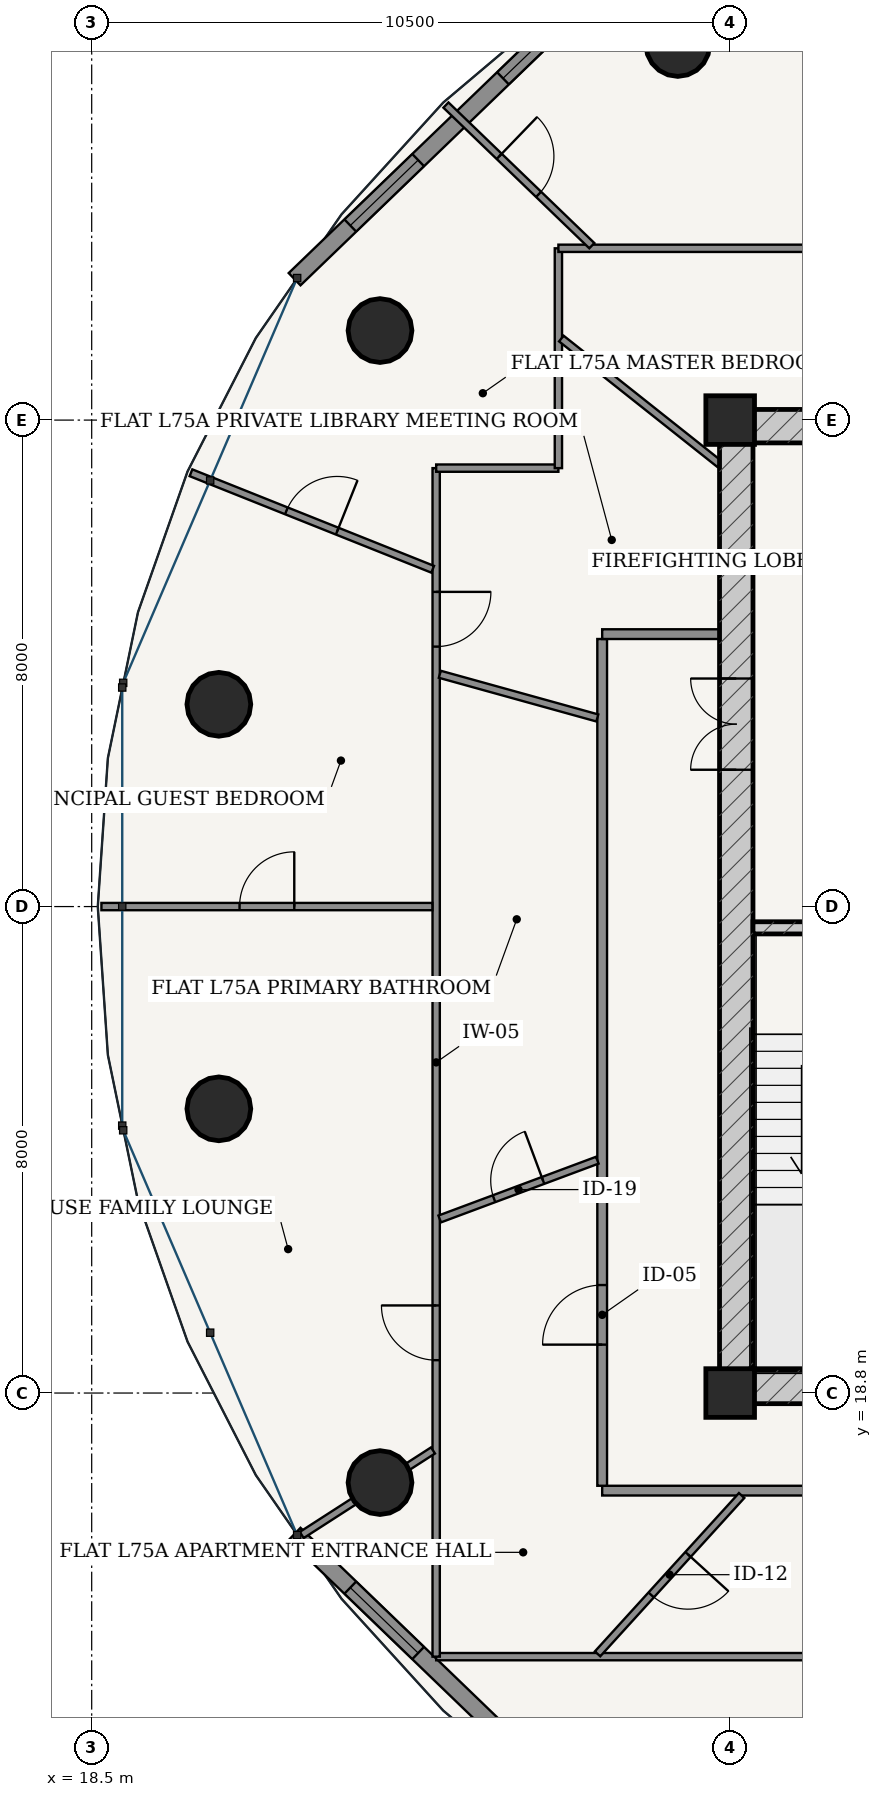
"""IFC4 building model, lengths in metres.
Left out: names, types, materials, properties, quantities, classifications, styles, units other than length and angle.
Written with IfcOpenShell. Run it as: python <this file> out.ifc"""

import sys

from ifc_helpers import new_model, si_unit, direction, frame, frame_2d, origin, origin_2d, place, context, subcontext, project, spatial, rectangle, hollow_circle, extrude, source, transform, mapped, element, fill, save


model = new_model("IFC4")
c1 = context("Model", 3, precision=1e-05, world=origin(), true_north=direction((-0.2419218956, 0.970295726276)))
c2 = subcontext(c1, "Body", "Model", "MODEL_VIEW")
j1 = project(units=[si_unit("LENGTHUNIT", "METRE"), si_unit("PLANEANGLEUNIT", "RADIAN")], contexts=[c1])
p1 = place(None, origin())
s1 = spatial("IfcSite", under=j1, at=p1, CompositionType="ELEMENT")
p2 = place(p1, origin())
s2 = spatial("IfcBuilding", under=s1, at=p2, CompositionType="ELEMENT")
p3 = place(p2, frame((0.0, 0.0, 285.7)))
s3 = spatial("IfcBuildingStorey", under=s2, at=p3, CompositionType="ELEMENT", Elevation=285.7)
for number, where, z_axis, x_axis in (
    (1, (29.0, 18.8, 0.0), (0.0, 0.0, 1.0), (1.0, 0.0, 0.0)),
    (2, (29.0, 34.8, 0.0), (0.0, 0.0, 1.0), (1.0, 0.0, 0.0)),
):
    element("IfcColumn", number, at=place(p3, frame(where, z_axis=z_axis, x_axis=x_axis)), inside=s3, PredefinedType="COLUMN", context=c2, shape_type="SweptSolid", body=[
        extrude(rectangle(XDim=0.8, YDim=0.8, at=origin_2d()), origin(), (0.0, 0.0, 1.0), 3.75),
    ])
p4 = place(p3, frame((28.825, 18.9, 0.0), z_axis=(0.0, 0.0, 1.0), x_axis=(1.0, 0.0, 0.0)))
e3 = element("IfcWall", 3, at=p4, inside=s3, PredefinedType="SHEAR", context=c2, shape_type="SweptSolid", body=[
    extrude(rectangle(XDim=18.35, YDim=0.55, at=frame_2d((9.175, 0.0))), origin(), (0.0, 0.0, 1.0), 3.49),
])
p5 = place(p4, frame((7.41, 0.0, 0.0)))
e4 = element("IfcOpeningElement", 4, at=p5, cuts=e3, PredefinedType="OPENING", context=c2, shape_type="SweptSolid", body=[
    extrude(rectangle(XDim=0.85, YDim=2.1, at=frame_2d((0.425, 1.05))), frame((0.0, 0.285, 0.0), z_axis=(0.0, -1.0, 0.0), x_axis=(1.0, 0.0, 0.0)), (0.0, 0.0, 1.0), 0.57),
])
p6 = place(p4, frame((10.49, 0.0, 0.0)))
e5 = element("IfcOpeningElement", 5, at=p6, cuts=e3, PredefinedType="OPENING", context=c2, shape_type="SweptSolid", body=[
    extrude(rectangle(XDim=0.85, YDim=2.1, at=frame_2d((0.425, 1.05))), frame((0.0, 0.285, 0.0), z_axis=(0.0, -1.0, 0.0), x_axis=(1.0, 0.0, 0.0)), (0.0, 0.0, 1.0), 0.57),
])
p7 = place(p3, frame((28.825, 34.7, 0.0), z_axis=(0.0, 0.0, 1.0), x_axis=(1.0, 0.0, 0.0)))
e6 = element("IfcWall", 6, at=p7, inside=s3, PredefinedType="SHEAR", context=c2, shape_type="SweptSolid", body=[
    extrude(rectangle(XDim=18.35, YDim=0.55, at=frame_2d((9.175, 0.0))), origin(), (0.0, 0.0, 1.0), 3.49),
])
p8 = place(p3, frame((29.1, 19.175, 0.0), z_axis=(0.0, 0.0, 1.0), x_axis=(0.0, 1.0, 0.0)))
e7 = element("IfcWall", 7, at=p8, inside=s3, PredefinedType="SHEAR", context=c2, shape_type="SweptSolid", body=[
    extrude(rectangle(XDim=15.25, YDim=0.55, at=frame_2d((7.625, 0.0))), origin(), (0.0, 0.0, 1.0), 3.49),
])
p9 = place(p8, frame((9.875, 0.0, 0.0)))
e8 = element("IfcOpeningElement", 8, at=p9, cuts=e7, PredefinedType="OPENING", context=c2, shape_type="SweptSolid", body=[
    extrude(rectangle(XDim=1.5, YDim=2.2, at=frame_2d((0.75, 1.1))), frame((0.0, 0.285, 0.0), z_axis=(0.0, -1.0, 0.0), x_axis=(1.0, 0.0, 0.0)), (0.0, 0.0, 1.0), 0.57),
])
p10 = place(p3, frame((29.375, 26.45, 0.0), z_axis=(0.0, 0.0, 1.0), x_axis=(1.0, 0.0, 0.0)))
e9 = element("IfcWall", 9, at=p10, inside=s3, PredefinedType="SOLIDWALL", context=c2, shape_type="SweptSolid", body=[
    extrude(rectangle(XDim=3.32, YDim=0.2, at=frame_2d((1.66, 0.0))), origin(), (0.0, 0.0, 1.0), 3.49),
])
p11 = place(p10, frame((1.185, 0.0, 0.0)))
e10 = element("IfcOpeningElement", 10, at=p11, cuts=e9, PredefinedType="OPENING", context=c2, shape_type="SweptSolid", body=[
    extrude(rectangle(XDim=0.95, YDim=2.15, at=frame_2d((0.475, 1.075))), frame((0.0, 0.11, 0.0), z_axis=(0.0, -1.0, 0.0), x_axis=(1.0, 0.0, 0.0)), (0.0, 0.0, 1.0), 0.22),
])
for number, where, z_axis, x_axis in (
    (11, (28.139, 40.977, 0.0), (0.0, 0.0, 1.0), (1.0, 0.0, 0.0)),
    (12, (23.241, 36.272, 0.0), (0.0, 0.0, 1.0), (1.0, 0.0, 0.0)),
    (13, (20.591, 30.126, 0.0), (0.0, 0.0, 1.0), (1.0, 0.0, 0.0)),
    (14, (20.591, 23.474, 0.0), (0.0, 0.0, 1.0), (1.0, 0.0, 0.0)),
    (15, (23.241, 17.328, 0.0), (0.0, 0.0, 1.0), (1.0, 0.0, 0.0)),
):
    element("IfcColumn", number, at=place(p3, frame(where, z_axis=z_axis, x_axis=x_axis)), inside=s3, PredefinedType="COLUMN", context=c2, shape_type="SweptSolid", body=[
        extrude(hollow_circle(Radius=0.525, WallThickness=0.035, at=origin_2d()), origin(), (0.0, 0.0, 1.0), 3.75),
    ])
p12 = place(p3, frame((27.296, 42.379, 0.0), z_axis=(0.0, 0.0, 1.0), x_axis=(-0.719979309073, -0.693995529169, 0.0)))
e16 = element("IfcWall", 16, at=p12, inside=s3, PredefinedType="SOLIDWALL", context=c2, shape_type="SweptSolid", body=[
    extrude(rectangle(XDim=7.583, YDim=0.28, at=frame_2d((3.791, 0.0))), origin(), (0.0, 0.0, 1.0), 3.49),
])
p13 = place(p12, frame((1.272, 0.0, 0.85)))
e17 = element("IfcOpeningElement", 17, at=p13, cuts=e16, PredefinedType="OPENING", context=c2, shape_type="SweptSolid", body=[
    extrude(rectangle(XDim=1.55, YDim=1.95, at=frame_2d((0.775, 0.975))), frame((0.0, 0.15, 0.0), z_axis=(0.0, -1.0, 0.0), x_axis=(1.0, 0.0, 0.0)), (0.0, 0.0, 1.0), 0.3),
])
p14 = place(p12, frame((4.76, 0.0, 0.85)))
e18 = element("IfcOpeningElement", 18, at=p14, cuts=e16, PredefinedType="OPENING", context=c2, shape_type="SweptSolid", body=[
    extrude(rectangle(XDim=1.55, YDim=1.95, at=frame_2d((0.775, 0.975))), frame((0.0, 0.15, 0.0), z_axis=(0.0, -1.0, 0.0), x_axis=(1.0, 0.0, 0.0)), (0.0, 0.0, 1.0), 0.3),
])
p15 = place(p3, frame((21.837, 16.483, 0.0), z_axis=(0.0, 0.0, 1.0), x_axis=(0.719995397366, -0.69397883813, 0.0)))
e19 = element("IfcWall", 19, at=p15, inside=s3, PredefinedType="SOLIDWALL", context=c2, shape_type="SweptSolid", body=[
    extrude(rectangle(XDim=7.582, YDim=0.28, at=frame_2d((3.791, 0.0))), origin(), (0.0, 0.0, 1.0), 3.49),
])
p16 = place(p15, frame((1.272, 0.0, 0.85)))
e20 = element("IfcOpeningElement", 20, at=p16, cuts=e19, PredefinedType="OPENING", context=c2, shape_type="SweptSolid", body=[
    extrude(rectangle(XDim=1.55, YDim=1.95, at=frame_2d((0.775, 0.975))), frame((0.0, 0.15, 0.0), z_axis=(0.0, -1.0, 0.0), x_axis=(1.0, 0.0, 0.0)), (0.0, 0.0, 1.0), 0.3),
])
p17 = place(p15, frame((4.76, 0.0, 0.85)))
e21 = element("IfcOpeningElement", 21, at=p17, cuts=e19, PredefinedType="OPENING", context=c2, shape_type="SweptSolid", body=[
    extrude(rectangle(XDim=1.55, YDim=1.95, at=frame_2d((0.775, 0.975))), frame((0.0, 0.15, 0.0), z_axis=(0.0, -1.0, 0.0), x_axis=(1.0, 0.0, 0.0)), (0.0, 0.0, 1.0), 0.3),
])
p18 = place(p3, frame((26.895, 17.195, 0.0), z_axis=(0.0, 0.0, 1.0), x_axis=(1.0, 0.0, 0.0)))
e22 = element("IfcWall", 22, at=p18, inside=s3, PredefinedType="PARTITIONING", context=c2, shape_type="SweptSolid", body=[
    extrude(rectangle(XDim=22.21, YDim=0.16, at=frame_2d((11.105, 0.0))), origin(), (0.0, 0.0, 1.0), 3.015),
])
p19 = place(p18, frame((17.365, 0.0, 0.0)))
e23 = element("IfcOpeningElement", 23, at=p19, cuts=e22, PredefinedType="OPENING", context=c2, shape_type="SweptSolid", body=[
    extrude(rectangle(XDim=0.98, YDim=2.2, at=frame_2d((0.49, 1.1))), frame((0.0, 0.09, 0.0), z_axis=(0.0, -1.0, 0.0), x_axis=(1.0, 0.0, 0.0)), (0.0, 0.0, 1.0), 0.18),
])
p20 = place(p3, frame((26.895, 17.275, 0.0), z_axis=(0.0, 0.0, 1.0), x_axis=(0.0, 1.0, 0.0)))
e24 = element("IfcWall", 24, at=p20, inside=s3, PredefinedType="PARTITIONING", context=c2, shape_type="SweptSolid", body=[
    extrude(rectangle(XDim=13.925, YDim=0.16, at=frame_2d((6.962, 0.0))), origin(), (0.0, 0.0, 1.0), 3.015),
])
p21 = place(p20, frame((2.321, 0.0, 0.0)))
e25 = element("IfcOpeningElement", 25, at=p21, cuts=e24, PredefinedType="OPENING", context=c2, shape_type="SweptSolid", body=[
    extrude(rectangle(XDim=0.98, YDim=2.2, at=frame_2d((0.49, 1.1))), frame((0.0, 0.09, 0.0), z_axis=(0.0, -1.0, 0.0), x_axis=(1.0, 0.0, 0.0)), (0.0, 0.0, 1.0), 0.18),
])
p22 = place(p3, frame((26.895, 31.28, 0.0), z_axis=(0.0, 0.0, 1.0), x_axis=(1.0, 0.0, 0.0)))
e26 = element("IfcWall", 26, at=p22, inside=s3, PredefinedType="PARTITIONING", context=c2, shape_type="SweptSolid", body=[
    extrude(rectangle(XDim=1.93, YDim=0.16, at=frame_2d((0.965, 0.0))), origin(), (0.0, 0.0, 1.0), 3.49),
])
p23 = place(p3, frame((35.353, 14.465, 0.0), z_axis=(0.0, 0.0, 1.0), x_axis=(-1.0, 0.0, 0.0)))
e27 = element("IfcWall", 27, at=p23, inside=s3, PredefinedType="PARTITIONING", context=c2, shape_type="SweptSolid", body=[
    extrude(rectangle(XDim=11.188, YDim=0.12, at=frame_2d((5.594, 0.0))), origin(), (0.0, 0.0, 1.0), 3.015),
])
p24 = place(p23, frame((3.997, 0.0, 0.0)))
e28 = element("IfcOpeningElement", 28, at=p24, cuts=e27, PredefinedType="OPENING", context=c2, shape_type="SweptSolid", body=[
    extrude(rectangle(XDim=0.9, YDim=2.15, at=frame_2d((0.45, 1.075))), frame((0.0, 0.07, 0.0), z_axis=(0.0, -1.0, 0.0), x_axis=(1.0, 0.0, 0.0)), (0.0, 0.0, 1.0), 0.14),
])
p25 = place(p3, frame((24.165, 14.465, 0.0), z_axis=(0.0, 0.0, 1.0), x_axis=(0.0, 1.0, 0.0)))
e29 = element("IfcWall", 29, at=p25, inside=s3, PredefinedType="PARTITIONING", context=c2, shape_type="SweptSolid", body=[
    extrude(rectangle(XDim=19.545, YDim=0.12, at=frame_2d((9.772, 0.0))), origin(), (0.0, 0.0, 1.0), 3.015),
])
p26 = place(p25, frame((4.875, 0.0, 0.0)))
e30 = element("IfcOpeningElement", 30, at=p26, cuts=e29, PredefinedType="OPENING", context=c2, shape_type="SweptSolid", body=[
    extrude(rectangle(XDim=0.9, YDim=2.15, at=frame_2d((0.45, 1.075))), frame((0.0, 0.07, 0.0), z_axis=(0.0, -1.0, 0.0), x_axis=(1.0, 0.0, 0.0)), (0.0, 0.0, 1.0), 0.14),
])
p27 = place(p25, frame((16.61, 0.0, 0.0)))
e31 = element("IfcOpeningElement", 31, at=p27, cuts=e29, PredefinedType="OPENING", context=c2, shape_type="SweptSolid", body=[
    extrude(rectangle(XDim=0.9, YDim=2.15, at=frame_2d((0.45, 1.075))), frame((0.0, 0.07, 0.0), z_axis=(0.0, -1.0, 0.0), x_axis=(1.0, 0.0, 0.0)), (0.0, 0.0, 1.0), 0.14),
])
p28 = place(p3, frame((24.165, 34.01, 0.0), z_axis=(0.0, 0.0, 1.0), x_axis=(1.0, 0.0, 0.0)))
e32 = element("IfcWall", 32, at=p28, inside=s3, PredefinedType="PARTITIONING", context=c2, shape_type="SweptSolid", body=[
    extrude(rectangle(XDim=2.01, YDim=0.12, at=frame_2d((1.005, 0.0))), origin(), (0.0, 0.0, 1.0), 3.209),
])
p29 = place(p3, frame((26.175, 34.01, 0.0), z_axis=(0.0, 0.0, 1.0), x_axis=(0.0, 1.0, 0.0)))
e33 = element("IfcWall", 33, at=p29, inside=s3, PredefinedType="PARTITIONING", context=c2, shape_type="SweptSolid", body=[
    extrude(rectangle(XDim=3.615, YDim=0.12, at=frame_2d((1.808, 0.0))), origin(), (0.0, 0.0, 1.0), 3.015),
])
p30 = place(p3, frame((26.175, 37.625, 0.0), z_axis=(0.0, 0.0, 1.0), x_axis=(1.0, 0.0, 0.0)))
e34 = element("IfcWall", 34, at=p30, inside=s3, PredefinedType="PARTITIONING", context=c2, shape_type="SweptSolid", body=[
    extrude(rectangle(XDim=13.957, YDim=0.12, at=frame_2d((6.979, 0.0))), origin(), (0.0, 0.0, 1.0), 3.015),
])
p31 = place(p30, frame((10.852, 0.0, 0.0)))
e35 = element("IfcOpeningElement", 35, at=p31, cuts=e34, PredefinedType="OPENING", context=c2, shape_type="SweptSolid", body=[
    extrude(rectangle(XDim=0.86, YDim=2.15, at=frame_2d((0.43, 1.075))), frame((0.0, 0.07, 0.0), z_axis=(0.0, -1.0, 0.0), x_axis=(1.0, 0.0, 0.0)), (0.0, 0.0, 1.0), 0.14),
])
p32 = place(p30, frame((4.183, 0.0, 0.0)))
e36 = element("IfcOpeningElement", 36, at=p32, cuts=e34, PredefinedType="OPENING", context=c2, shape_type="SweptSolid", body=[
    extrude(rectangle(XDim=0.9, YDim=2.15, at=frame_2d((0.45, 1.075))), frame((0.0, 0.07, 0.0), z_axis=(0.0, -1.0, 0.0), x_axis=(1.0, 0.0, 0.0)), (0.0, 0.0, 1.0), 0.14),
])
p33 = place(p3, frame((26.725, 37.668, 0.0), z_axis=(0.0, 0.0, 1.0), x_axis=(-0.719954096891, 0.694021684366, 0.0)))
e37 = element("IfcWall", 37, at=p33, inside=s3, PredefinedType="PARTITIONING", context=c2, shape_type="SweptSolid", body=[
    extrude(rectangle(XDim=3.333, YDim=0.12, at=frame_2d((1.667, 0.0))), origin(), (0.0, 0.0, 1.0), 3.121),
])
p34 = place(p33, frame((1.216, 0.0, 0.0)))
e38 = element("IfcOpeningElement", 38, at=p34, cuts=e37, PredefinedType="OPENING", context=c2, shape_type="SweptSolid", body=[
    extrude(rectangle(XDim=0.9, YDim=2.15, at=frame_2d((0.45, 1.075))), frame((0.0, 0.07, 0.0), z_axis=(0.0, -1.0, 0.0), x_axis=(1.0, 0.0, 0.0)), (0.0, 0.0, 1.0), 0.14),
])
p35 = place(p3, frame((24.107, 32.347, 0.0), z_axis=(0.0, 0.0, 1.0), x_axis=(-0.928712556691, 0.370800467966, 0.0)))
e39 = element("IfcWall", 39, at=p35, inside=s3, PredefinedType="PARTITIONING", context=c2, shape_type="SweptSolid", body=[
    extrude(rectangle(XDim=4.28, YDim=0.12, at=frame_2d((2.14, 0.0))), origin(), (0.0, 0.0, 1.0), 3.121),
])
p36 = place(p35, frame((1.69, 0.0, 0.0)))
e40 = element("IfcOpeningElement", 40, at=p36, cuts=e39, PredefinedType="OPENING", context=c2, shape_type="SweptSolid", body=[
    extrude(rectangle(XDim=0.9, YDim=2.15, at=frame_2d((0.45, 1.075))), frame((0.0, 0.07, 0.0), z_axis=(0.0, -1.0, 0.0), x_axis=(1.0, 0.0, 0.0)), (0.0, 0.0, 1.0), 0.14),
])
p37 = place(p3, frame((24.103, 26.8, 0.0), z_axis=(0.0, 0.0, 1.0), x_axis=(-1.0, 0.0, 0.0)))
e41 = element("IfcWall", 41, at=p37, inside=s3, PredefinedType="PARTITIONING", context=c2, shape_type="SweptSolid", body=[
    extrude(rectangle(XDim=5.443, YDim=0.12, at=frame_2d((2.722, 0.0))), origin(), (0.0, 0.0, 1.0), 3.121),
])
p38 = place(p37, frame((2.271, 0.0, 0.0)))
e42 = element("IfcOpeningElement", 42, at=p38, cuts=e41, PredefinedType="OPENING", context=c2, shape_type="SweptSolid", body=[
    extrude(rectangle(XDim=0.9, YDim=2.15, at=frame_2d((0.45, 1.075))), frame((0.0, 0.07, 0.0), z_axis=(0.0, -1.0, 0.0), x_axis=(1.0, 0.0, 0.0)), (0.0, 0.0, 1.0), 0.14),
])
p39 = place(p3, frame((24.113, 17.856, 0.0), z_axis=(0.0, 0.0, 1.0), x_axis=(-0.840708587197, -0.54148783127, 0.0)))
e43 = element("IfcWall", 43, at=p39, inside=s3, PredefinedType="PARTITIONING", context=c2, shape_type="SweptSolid", body=[
    extrude(rectangle(XDim=2.568, YDim=0.12, at=frame_2d((1.284, 0.0))), origin(), (0.0, 0.0, 1.0), 3.015),
])
p40 = place(p3, frame((28.825, 34.077, 0.0), z_axis=(0.0, 0.0, 1.0), x_axis=(-0.783444596274, 0.621461635637, 0.0)))
e44 = element("IfcWall", 44, at=p40, inside=s3, PredefinedType="PARTITIONING", context=c2, shape_type="SweptSolid", body=[
    extrude(rectangle(XDim=3.32, YDim=0.12, at=frame_2d((1.66, 0.0))), origin(), (0.0, 0.0, 1.0), 3.209),
])
p41 = place(p3, frame((26.815, 29.902, 0.0), z_axis=(0.0, 0.0, 1.0), x_axis=(-0.963610243268, 0.267311240073, 0.0)))
e45 = element("IfcWall", 45, at=p41, inside=s3, PredefinedType="PARTITIONING", context=c2, shape_type="SweptSolid", body=[
    extrude(rectangle(XDim=2.688, YDim=0.12, at=frame_2d((1.344, 0.0))), origin(), (0.0, 0.0, 1.0), 3.209),
])
p42 = place(p3, frame((26.815, 22.629, 0.0), z_axis=(0.0, 0.0, 1.0), x_axis=(-0.93696600231, -0.349420535338, 0.0)))
e46 = element("IfcWall", 46, at=p42, inside=s3, PredefinedType="PARTITIONING", context=c2, shape_type="SweptSolid", body=[
    extrude(rectangle(XDim=2.766, YDim=0.12, at=frame_2d((1.383, 0.0))), origin(), (0.0, 0.0, 1.0), 3.209),
])
p43 = place(p42, frame((0.953, 0.0, 0.0)))
e47 = element("IfcOpeningElement", 47, at=p43, cuts=e46, PredefinedType="OPENING", context=c2, shape_type="SweptSolid", body=[
    extrude(rectangle(XDim=0.86, YDim=2.15, at=frame_2d((0.43, 1.075))), frame((0.0, 0.07, 0.0), z_axis=(0.0, -1.0, 0.0), x_axis=(1.0, 0.0, 0.0)), (0.0, 0.0, 1.0), 0.14),
])
p44 = place(p3, frame((29.188, 17.115, 0.0), z_axis=(0.0, 0.0, 1.0), x_axis=(-0.67292817107, -0.739707831904, 0.0)))
e48 = element("IfcWall", 48, at=p44, inside=s3, PredefinedType="PARTITIONING", context=c2, shape_type="SweptSolid", body=[
    extrude(rectangle(XDim=3.521, YDim=0.12, at=frame_2d((1.76, 0.0))), origin(), (0.0, 0.0, 1.0), 3.015),
])
p45 = place(p44, frame((1.31, 0.0, 0.0)))
e49 = element("IfcOpeningElement", 49, at=p45, cuts=e48, PredefinedType="OPENING", context=c2, shape_type="SweptSolid", body=[
    extrude(rectangle(XDim=0.9, YDim=2.15, at=frame_2d((0.45, 1.075))), frame((0.0, 0.07, 0.0), z_axis=(0.0, -1.0, 0.0), x_axis=(1.0, 0.0, 0.0)), (0.0, 0.0, 1.0), 0.14),
])
m1 = source(origin(), c2, "Body", "SweptSolid", [
    extrude(rectangle(XDim=1.55, YDim=1.95, at=frame_2d((0.775, 0.975))), frame((0.0, 0.03, 0.0), z_axis=(0.0, -1.0, 0.0), x_axis=(1.0, 0.0, 0.0)), (0.0, 0.0, 1.0), 0.06),
])
p46 = place(p13, origin())
e50 = element("IfcWindow", 50, at=p46, inside=s3, PartitioningType="SINGLE_PANEL", PredefinedType="WINDOW", context=c2, shape_type="MappedRepresentation", body=[
    mapped(m1, transform((0.0, 0.0, 0.0), scale=1.0)),
])
fill(e17, e50)
p47 = place(p14, origin())
e51 = element("IfcWindow", 51, at=p47, inside=s3, PartitioningType="SINGLE_PANEL", PredefinedType="WINDOW", context=c2, shape_type="MappedRepresentation", body=[
    mapped(m1, transform((0.0, 0.0, 0.0), scale=1.0)),
])
fill(e18, e51)
p48 = place(p16, origin())
e52 = element("IfcWindow", 52, at=p48, inside=s3, PartitioningType="SINGLE_PANEL", PredefinedType="WINDOW", context=c2, shape_type="MappedRepresentation", body=[
    mapped(m1, transform((0.0, 0.0, 0.0), scale=1.0)),
])
fill(e20, e52)
m2 = source(origin(), c2, "Body", "SweptSolid", [
    extrude(rectangle(XDim=1.5, YDim=2.2, at=frame_2d((0.75, 1.1))), frame((0.0, 0.025, 0.0), z_axis=(0.0, -1.0, 0.0), x_axis=(1.0, 0.0, 0.0)), (0.0, 0.0, 1.0), 0.05),
])
p49 = place(p9, origin())
e53 = element("IfcDoor", 53, at=p49, inside=s3, OperationType="DOUBLE_DOOR_SINGLE_SWING", PredefinedType="DOOR", context=c2, shape_type="MappedRepresentation", body=[
    mapped(m2, transform((0.0, 0.0, 0.0), scale=1.0)),
])
fill(e8, e53)
m3 = source(origin(), c2, "Body", "SweptSolid", [
    extrude(rectangle(XDim=0.98, YDim=2.2, at=frame_2d((0.49, 1.1))), frame((0.0, 0.025, 0.0), z_axis=(0.0, -1.0, 0.0), x_axis=(1.0, 0.0, 0.0)), (0.0, 0.0, 1.0), 0.05),
])
p50 = place(p21, origin())
e54 = element("IfcDoor", 54, at=p50, inside=s3, OperationType="SINGLE_SWING_LEFT", PredefinedType="DOOR", context=c2, shape_type="MappedRepresentation", body=[
    mapped(m3, transform((0.0, 0.0, 0.0), scale=1.0)),
])
fill(e25, e54)
m4 = source(origin(), c2, "Body", "SweptSolid", [
    extrude(rectangle(XDim=0.86, YDim=2.15, at=frame_2d((0.43, 1.075))), frame((0.0, 0.025, 0.0), z_axis=(0.0, -1.0, 0.0), x_axis=(1.0, 0.0, 0.0)), (0.0, 0.0, 1.0), 0.05),
])
p51 = place(p43, frame((0.86, 0.0, 0.0), z_axis=(0.0, 0.0, 1.0), x_axis=(-1.0, 0.0, 0.0)))
e55 = element("IfcDoor", 55, at=p51, inside=s3, OperationType="SINGLE_SWING_RIGHT", PredefinedType="DOOR", context=c2, shape_type="MappedRepresentation", body=[
    mapped(m4, transform((0.0, 0.0, 0.0), scale=1.0)),
])
fill(e47, e55)
m5 = source(origin(), c2, "Body", "SweptSolid", [
    extrude(rectangle(XDim=0.9, YDim=2.15, at=frame_2d((0.45, 1.075))), frame((0.0, 0.025, 0.0), z_axis=(0.0, -1.0, 0.0), x_axis=(1.0, 0.0, 0.0)), (0.0, 0.0, 1.0), 0.05),
])
p52 = place(p45, origin())
e56 = element("IfcDoor", 56, at=p52, inside=s3, OperationType="SINGLE_SWING_LEFT", PredefinedType="DOOR", context=c2, shape_type="MappedRepresentation", body=[
    mapped(m5, transform((0.0, 0.0, 0.0), scale=1.0)),
])
fill(e49, e56)
p53 = place(p26, origin())
e57 = element("IfcDoor", 57, at=p53, inside=s3, OperationType="SINGLE_SWING_RIGHT", PredefinedType="DOOR", context=c2, shape_type="MappedRepresentation", body=[
    mapped(m5, transform((0.0, 0.0, 0.0), scale=1.0)),
])
fill(e30, e57)
p54 = place(p38, frame((0.9, 0.0, 0.0), z_axis=(0.0, 0.0, 1.0), x_axis=(-1.0, 0.0, 0.0)))
e58 = element("IfcDoor", 58, at=p54, inside=s3, OperationType="SINGLE_SWING_RIGHT", PredefinedType="DOOR", context=c2, shape_type="MappedRepresentation", body=[
    mapped(m5, transform((0.0, 0.0, 0.0), scale=1.0)),
])
fill(e42, e58)
p55 = place(p27, frame((0.9, 0.0, 0.0), z_axis=(0.0, 0.0, 1.0), x_axis=(-1.0, 0.0, 0.0)))
e59 = element("IfcDoor", 59, at=p55, inside=s3, OperationType="SINGLE_SWING_LEFT", PredefinedType="DOOR", context=c2, shape_type="MappedRepresentation", body=[
    mapped(m5, transform((0.0, 0.0, 0.0), scale=1.0)),
])
fill(e31, e59)
p56 = place(p36, frame((0.9, 0.0, 0.0), z_axis=(0.0, 0.0, 1.0), x_axis=(-1.0, 0.0, 0.0)))
e60 = element("IfcDoor", 60, at=p56, inside=s3, OperationType="SINGLE_SWING_RIGHT", PredefinedType="DOOR", context=c2, shape_type="MappedRepresentation", body=[
    mapped(m5, transform((0.0, 0.0, 0.0), scale=1.0)),
])
fill(e40, e60)
p57 = place(p34, frame((0.9, 0.0, 0.0), z_axis=(0.0, 0.0, 1.0), x_axis=(-1.0, 0.0, 0.0)))
e61 = element("IfcDoor", 61, at=p57, inside=s3, OperationType="SINGLE_SWING_LEFT", PredefinedType="DOOR", context=c2, shape_type="MappedRepresentation", body=[
    mapped(m5, transform((0.0, 0.0, 0.0), scale=1.0)),
])
fill(e38, e61)
save(model, sys.argv[1])
